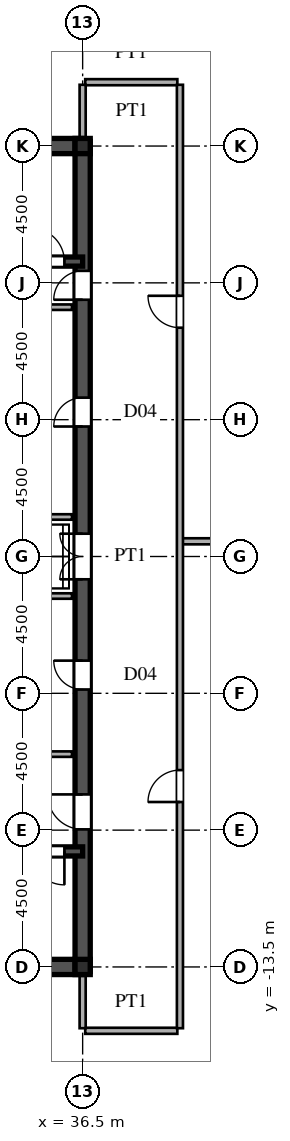
"""IFC4 building model, lengths in metres.
Left out: names, types, materials, properties, quantities, classifications, styles, units other than length and angle.
Written with IfcOpenShell. Run it as: python <this file> out.ifc"""

import sys

from ifc_helpers import new_model, si_unit, direction, frame, frame_2d, origin, origin_2d, place, context, subcontext, project, spatial, rectangle, i_section, extrude, source, transform, mapped, element, fill, save


model = new_model("IFC4")
c1 = context("Model", 3, precision=1e-05, world=origin(), true_north=direction((0.0, 1.0)))
c2 = subcontext(c1, "Body", "Model", "MODEL_VIEW")
j1 = project(units=[si_unit("LENGTHUNIT", "METRE"), si_unit("PLANEANGLEUNIT", "RADIAN")], contexts=[c1])
p1 = place(None, origin())
s1 = spatial("IfcSite", under=j1, at=p1, CompositionType="ELEMENT")
p2 = place(p1, origin())
s2 = spatial("IfcBuilding", under=s1, at=p2, CompositionType="ELEMENT")
p3 = place(p2, frame((0.0, 0.0, 229.8)))
s3 = spatial("IfcBuildingStorey", under=s2, at=p3, CompositionType="ELEMENT", Elevation=229.8)
m1 = source(origin(), c2, "Body", "SweptSolid", [
    extrude(i_section(OverallWidth=0.5, OverallDepth=0.5, WebThickness=0.02, FlangeThickness=0.032, at=origin_2d()), origin(), (0.0, 0.0, 1.0), 4.8),
])
for number, where, z_axis, x_axis in (
    (1, (36.5, -13.5, 0.0), (0.0, 0.0, 1.0), (1.0, 0.0, 0.0)),
    (2, (36.5, 13.5, 0.0), (0.0, 0.0, 1.0), (1.0, 0.0, 0.0)),
):
    element("IfcColumn", number, at=place(p3, frame(where, z_axis=z_axis, x_axis=x_axis)), inside=s3, PredefinedType="COLUMN", context=c2, shape_type="MappedRepresentation", body=[
        mapped(m1, transform((0.0, 0.0, 0.0), scale=1.0)),
    ])
for number, where, z_axis, x_axis in (
    (3, (27.5, -13.5, 0.0), (0.0, 0.0, 1.0), (1.0, 0.0, 0.0)),
    (4, (27.5, 13.5, 0.0), (0.0, 0.0, 1.0), (1.0, 0.0, 0.0)),
):
    element("IfcWall", number, at=place(p3, frame(where, z_axis=z_axis, x_axis=x_axis)), inside=s3, PredefinedType="SHEAR", context=c2, shape_type="SweptSolid", body=[
        extrude(rectangle(XDim=9.0, YDim=0.5, at=frame_2d((4.5, 0.0))), origin(), (0.0, 0.0, 1.0), 4.54),
    ])
p4 = place(p3, frame((36.5, -13.65, 0.0), z_axis=(0.0, 0.0, 1.0), x_axis=(0.0, 1.0, 0.0)))
e5 = element("IfcWall", 5, at=p4, inside=s3, PredefinedType="SHEAR", context=c2, shape_type="SweptSolid", body=[
    extrude(rectangle(XDim=7.15, YDim=0.5, at=frame_2d((3.575, 0.0))), origin(), (0.0, 0.0, 1.0), 4.54),
])
p5 = place(p4, frame((4.675, 0.0, 0.0)))
e6 = element("IfcOpeningElement", 6, at=p5, cuts=e5, PredefinedType="OPENING", context=c2, shape_type="SweptSolid", body=[
    extrude(rectangle(XDim=1.15, YDim=2.2, at=frame_2d((0.575, 1.1))), frame((0.0, 0.26, 0.0), z_axis=(0.0, -1.0, 0.0), x_axis=(1.0, 0.0, 0.0)), (0.0, 0.0, 1.0), 0.52),
])
p6 = place(p3, frame((36.5, -1.3, 0.0), z_axis=(0.0, 0.0, 1.0), x_axis=(0.0, 1.0, 0.0)))
e7 = element("IfcWall", 7, at=p6, inside=s3, PredefinedType="SHEAR", context=c2, shape_type="SweptSolid", body=[
    extrude(rectangle(XDim=2.6, YDim=0.5, at=frame_2d((1.3, 0.0))), origin(), (0.0, 0.0, 1.0), 4.54),
])
p7 = place(p6, frame((0.55, 0.0, 0.0)))
e8 = element("IfcOpeningElement", 8, at=p7, cuts=e7, PredefinedType="OPENING", context=c2, shape_type="SweptSolid", body=[
    extrude(rectangle(XDim=1.5, YDim=2.3, at=frame_2d((0.75, 1.15))), frame((0.0, 0.26, 0.0), z_axis=(0.0, -1.0, 0.0), x_axis=(1.0, 0.0, 0.0)), (0.0, 0.0, 1.0), 0.52),
])
p8 = place(p3, frame((36.5, 8.2, 0.0), z_axis=(0.0, 0.0, 1.0), x_axis=(0.0, 1.0, 0.0)))
e9 = element("IfcWall", 9, at=p8, inside=s3, PredefinedType="SHEAR", context=c2, shape_type="SweptSolid", body=[
    extrude(rectangle(XDim=5.45, YDim=0.5, at=frame_2d((2.725, 0.0))), origin(), (0.0, 0.0, 1.0), 4.54),
])
p9 = place(p8, frame((0.245, 0.0, 0.0)))
e10 = element("IfcOpeningElement", 10, at=p9, cuts=e9, PredefinedType="OPENING", context=c2, shape_type="SweptSolid", body=[
    extrude(rectangle(XDim=0.95, YDim=2.15, at=frame_2d((0.475, 1.075))), frame((0.0, 0.26, 0.0), z_axis=(0.0, -1.0, 0.0), x_axis=(1.0, 0.0, 0.0)), (0.0, 0.0, 1.0), 0.52),
])
p10 = place(p3, frame((36.5, -6.5, 0.0), z_axis=(0.0, 0.0, 1.0), x_axis=(0.0, 1.0, 0.0)))
e11 = element("IfcWall", 11, at=p10, inside=s3, PredefinedType="SHEAR", context=c2, shape_type="SweptSolid", body=[
    extrude(rectangle(XDim=5.2, YDim=0.5, at=frame_2d((2.6, 0.0))), origin(), (0.0, 0.0, 1.0), 4.54),
])
p11 = place(p10, frame((2.125, 0.0, 0.0)))
e12 = element("IfcOpeningElement", 12, at=p11, cuts=e11, PredefinedType="OPENING", context=c2, shape_type="SweptSolid", body=[
    extrude(rectangle(XDim=0.95, YDim=2.15, at=frame_2d((0.475, 1.075))), frame((0.0, 0.26, 0.0), z_axis=(0.0, -1.0, 0.0), x_axis=(1.0, 0.0, 0.0)), (0.0, 0.0, 1.0), 0.52),
])
p12 = place(p3, frame((36.5, 1.3, 0.0), z_axis=(0.0, 0.0, 1.0), x_axis=(0.0, 1.0, 0.0)))
e13 = element("IfcWall", 13, at=p12, inside=s3, PredefinedType="SHEAR", context=c2, shape_type="SweptSolid", body=[
    extrude(rectangle(XDim=6.9, YDim=0.5, at=frame_2d((3.45, 0.0))), origin(), (0.0, 0.0, 1.0), 4.54),
])
p13 = place(p12, frame((2.975, 0.0, 0.0)))
e14 = element("IfcOpeningElement", 14, at=p13, cuts=e13, PredefinedType="OPENING", context=c2, shape_type="SweptSolid", body=[
    extrude(rectangle(XDim=0.95, YDim=2.15, at=frame_2d((0.475, 1.075))), frame((0.0, 0.26, 0.0), z_axis=(0.0, -1.0, 0.0), x_axis=(1.0, 0.0, 0.0)), (0.0, 0.0, 1.0), 0.52),
])
p14 = place(p3, frame((27.5, -9.7, 0.0), z_axis=(0.0, 0.0, 1.0), x_axis=(1.0, 0.0, 0.0)))
e15 = element("IfcWall", 15, at=p14, inside=s3, PredefinedType="SHEAR", context=c2, shape_type="SweptSolid", body=[
    extrude(rectangle(XDim=9.0, YDim=0.3, at=frame_2d((4.5, 0.0))), origin(), (0.0, 0.0, 1.0), 4.54),
])
p15 = place(p14, frame((7.3, 0.0, 0.0)))
e16 = element("IfcOpeningElement", 16, at=p15, cuts=e15, PredefinedType="OPENING", context=c2, shape_type="SweptSolid", body=[
    extrude(rectangle(XDim=1.1, YDim=2.2, at=frame_2d((0.55, 1.1))), frame((0.0, 0.16, 0.0), z_axis=(0.0, -1.0, 0.0), x_axis=(1.0, 0.0, 0.0)), (0.0, 0.0, 1.0), 0.32),
])
p16 = place(p3, frame((27.5, 9.7, 0.0), z_axis=(0.0, 0.0, 1.0), x_axis=(1.0, 0.0, 0.0)))
e17 = element("IfcWall", 17, at=p16, inside=s3, PredefinedType="SHEAR", context=c2, shape_type="SweptSolid", body=[
    extrude(rectangle(XDim=9.0, YDim=0.3, at=frame_2d((4.5, 0.0))), origin(), (0.0, 0.0, 1.0), 4.54),
])
p17 = place(p16, frame((7.3, 0.0, 0.0)))
e18 = element("IfcOpeningElement", 18, at=p17, cuts=e17, PredefinedType="OPENING", context=c2, shape_type="SweptSolid", body=[
    extrude(rectangle(XDim=1.1, YDim=2.2, at=frame_2d((0.55, 1.1))), frame((0.0, 0.16, 0.0), z_axis=(0.0, -1.0, 0.0), x_axis=(1.0, 0.0, 0.0)), (0.0, 0.0, 1.0), 0.32),
])
for number, where, z_axis, x_axis in (
    (19, (30.45, -6.5, 0.0), (0.0, 0.0, 1.0), (1.0, 0.0, 0.0)),
    (20, (30.45, 8.2, 0.0), (0.0, 0.0, 1.0), (1.0, 0.0, 0.0)),
):
    element("IfcWall", number, at=place(p3, frame(where, z_axis=z_axis, x_axis=x_axis)), inside=s3, PredefinedType="PARTITIONING", context=c2, shape_type="SweptSolid", body=[
        extrude(rectangle(XDim=5.7, YDim=0.18, at=frame_2d((2.85, 0.0))), origin(), (0.0, 0.0, 1.0), 4.54),
    ])
for number, where, z_axis, x_axis in (
    (21, (33.2, -1.3, 0.0), (0.0, 0.0, 1.0), (1.0, 0.0, 0.0)),
    (22, (33.2, 1.3, 0.0), (0.0, 0.0, 1.0), (1.0, 0.0, 0.0)),
):
    element("IfcWall", number, at=place(p3, frame(where, z_axis=z_axis, x_axis=x_axis)), inside=s3, PredefinedType="PARTITIONING", context=c2, shape_type="SweptSolid", body=[
        extrude(rectangle(XDim=2.95, YDim=0.18, at=frame_2d((1.475, 0.0))), origin(), (0.0, 0.0, 1.0), 4.54),
    ])
p18 = place(p3, frame((36.585, -15.6, 0.0), z_axis=(0.0, 0.0, 1.0), x_axis=(1.0, 0.0, 0.0)))
e23 = element("IfcWall", 23, at=p18, inside=s3, PredefinedType="PARTITIONING", context=c2, shape_type="SweptSolid", body=[
    extrude(rectangle(XDim=3.03, YDim=0.2, at=frame_2d((1.515, 0.0))), origin(), (0.0, 0.0, 1.0), 4.54),
])
p19 = place(p3, frame((39.78, 0.5, 0.0), z_axis=(0.0, 0.0, 1.0), x_axis=(1.0, 0.0, 0.0)))
e24 = element("IfcWall", 24, at=p19, inside=s3, PredefinedType="PARTITIONING", context=c2, shape_type="SweptSolid", body=[
    extrude(rectangle(XDim=27.725, YDim=0.2, at=frame_2d((13.862, 0.0))), origin(), (0.0, 0.0, 1.0), 4.54),
])
p20 = place(p3, frame((36.585, 15.6, 0.0), z_axis=(0.0, 0.0, 1.0), x_axis=(1.0, 0.0, 0.0)))
e25 = element("IfcWall", 25, at=p20, inside=s3, PredefinedType="PARTITIONING", context=c2, shape_type="SweptSolid", body=[
    extrude(rectangle(XDim=3.03, YDim=0.2, at=frame_2d((1.515, 0.0))), origin(), (0.0, 0.0, 1.0), 4.54),
])
for number, where, z_axis, x_axis in (
    (26, (36.5, -15.515, 0.0), (0.0, 0.0, 1.0), (0.0, 1.0, 0.0)),
    (27, (36.5, 13.755, 0.0), (0.0, 0.0, 1.0), (0.0, 1.0, 0.0)),
):
    element("IfcWall", number, at=place(p3, frame(where, z_axis=z_axis, x_axis=x_axis)), inside=s3, PredefinedType="PARTITIONING", context=c2, shape_type="SweptSolid", body=[
        extrude(rectangle(XDim=1.76, YDim=0.2, at=frame_2d((0.88, 0.0))), origin(), (0.0, 0.0, 1.0), 3.94),
    ])
p21 = place(p3, frame((39.7, -15.515, 0.0), z_axis=(0.0, 0.0, 1.0), x_axis=(0.0, 1.0, 0.0)))
e28 = element("IfcWall", 28, at=p21, inside=s3, PredefinedType="PARTITIONING", context=c2, shape_type="SweptSolid", body=[
    extrude(rectangle(XDim=31.03, YDim=0.2, at=frame_2d((15.515, 0.0))), origin(), (0.0, 0.0, 1.0), 4.54),
])
p22 = place(p21, frame((7.44, 0.0, 0.0)))
e29 = element("IfcOpeningElement", 29, at=p22, cuts=e28, PredefinedType="OPENING", context=c2, shape_type="SweptSolid", body=[
    extrude(rectangle(XDim=1.05, YDim=2.25, at=frame_2d((0.525, 1.125))), frame((0.0, 0.11, 0.0), z_axis=(0.0, -1.0, 0.0), x_axis=(1.0, 0.0, 0.0)), (0.0, 0.0, 1.0), 0.22),
])
p23 = place(p21, frame((23.04, 0.0, 0.0)))
e30 = element("IfcOpeningElement", 30, at=p23, cuts=e28, PredefinedType="OPENING", context=c2, shape_type="SweptSolid", body=[
    extrude(rectangle(XDim=1.05, YDim=2.25, at=frame_2d((0.525, 1.125))), frame((0.0, 0.11, 0.0), z_axis=(0.0, -1.0, 0.0), x_axis=(1.0, 0.0, 0.0)), (0.0, 0.0, 1.0), 0.22),
])
m2 = source(origin(), c2, "Body", "SweptSolid", [
    extrude(rectangle(XDim=1.15, YDim=2.2, at=frame_2d((0.575, 1.1))), frame((0.0, 0.025, 0.0), z_axis=(0.0, -1.0, 0.0), x_axis=(1.0, 0.0, 0.0)), (0.0, 0.0, 1.0), 0.05),
])
p24 = place(p5, origin())
e31 = element("IfcDoor", 31, at=p24, inside=s3, OperationType="SINGLE_SWING_RIGHT", PredefinedType="DOOR", context=c2, shape_type="MappedRepresentation", body=[
    mapped(m2, transform((0.0, 0.0, 0.0), scale=1.0)),
])
fill(e6, e31)
m3 = source(origin(), c2, "Body", "SweptSolid", [
    extrude(rectangle(XDim=1.5, YDim=2.3, at=frame_2d((0.75, 1.15))), frame((0.0, 0.025, 0.0), z_axis=(0.0, -1.0, 0.0), x_axis=(1.0, 0.0, 0.0)), (0.0, 0.0, 1.0), 0.05),
])
p25 = place(p7, origin())
e32 = element("IfcDoor", 32, at=p25, inside=s3, OperationType="DOUBLE_SWING_LEFT", PredefinedType="DOOR", context=c2, shape_type="MappedRepresentation", body=[
    mapped(m3, transform((0.0, 0.0, 0.0), scale=1.0)),
])
fill(e8, e32)
m4 = source(origin(), c2, "Body", "SweptSolid", [
    extrude(rectangle(XDim=0.95, YDim=2.15, at=frame_2d((0.475, 1.075))), frame((0.0, 0.025, 0.0), z_axis=(0.0, -1.0, 0.0), x_axis=(1.0, 0.0, 0.0)), (0.0, 0.0, 1.0), 0.05),
])
p26 = place(p9, origin())
e33 = element("IfcDoor", 33, at=p26, inside=s3, OperationType="SINGLE_SWING_LEFT", PredefinedType="DOOR", context=c2, shape_type="MappedRepresentation", body=[
    mapped(m4, transform((0.0, 0.0, 0.0), scale=1.0)),
])
fill(e10, e33)
p27 = place(p11, origin())
e34 = element("IfcDoor", 34, at=p27, inside=s3, OperationType="SINGLE_SWING_RIGHT", PredefinedType="DOOR", context=c2, shape_type="MappedRepresentation", body=[
    mapped(m4, transform((0.0, 0.0, 0.0), scale=1.0)),
])
fill(e12, e34)
p28 = place(p13, origin())
e35 = element("IfcDoor", 35, at=p28, inside=s3, OperationType="SINGLE_SWING_LEFT", PredefinedType="DOOR", context=c2, shape_type="MappedRepresentation", body=[
    mapped(m4, transform((0.0, 0.0, 0.0), scale=1.0)),
])
fill(e14, e35)
m5 = source(origin(), c2, "Body", "SweptSolid", [
    extrude(rectangle(XDim=1.1, YDim=2.2, at=frame_2d((0.55, 1.1))), frame((0.0, 0.025, 0.0), z_axis=(0.0, -1.0, 0.0), x_axis=(1.0, 0.0, 0.0)), (0.0, 0.0, 1.0), 0.05),
])
p29 = place(p15, frame((1.1, 0.0, 0.0), z_axis=(0.0, 0.0, 1.0), x_axis=(-1.0, 0.0, 0.0)))
e36 = element("IfcDoor", 36, at=p29, inside=s3, OperationType="SINGLE_SWING_RIGHT", PredefinedType="DOOR", context=c2, shape_type="MappedRepresentation", body=[
    mapped(m5, transform((0.0, 0.0, 0.0), scale=1.0)),
])
fill(e16, e36)
p30 = place(p17, origin())
e37 = element("IfcDoor", 37, at=p30, inside=s3, OperationType="SINGLE_SWING_LEFT", PredefinedType="DOOR", context=c2, shape_type="MappedRepresentation", body=[
    mapped(m5, transform((0.0, 0.0, 0.0), scale=1.0)),
])
fill(e18, e37)
m6 = source(origin(), c2, "Body", "SweptSolid", [
    extrude(rectangle(XDim=1.05, YDim=2.25, at=frame_2d((0.525, 1.125))), frame((0.0, 0.025, 0.0), z_axis=(0.0, -1.0, 0.0), x_axis=(1.0, 0.0, 0.0)), (0.0, 0.0, 1.0), 0.05),
])
p31 = place(p22, origin())
e38 = element("IfcDoor", 38, at=p31, inside=s3, OperationType="SINGLE_SWING_LEFT", PredefinedType="DOOR", context=c2, shape_type="MappedRepresentation", body=[
    mapped(m6, transform((0.0, 0.0, 0.0), scale=1.0)),
])
fill(e29, e38)
p32 = place(p23, origin())
e39 = element("IfcDoor", 39, at=p32, inside=s3, OperationType="SINGLE_SWING_RIGHT", PredefinedType="DOOR", context=c2, shape_type="MappedRepresentation", body=[
    mapped(m6, transform((0.0, 0.0, 0.0), scale=1.0)),
])
fill(e30, e39)
save(model, sys.argv[1])
